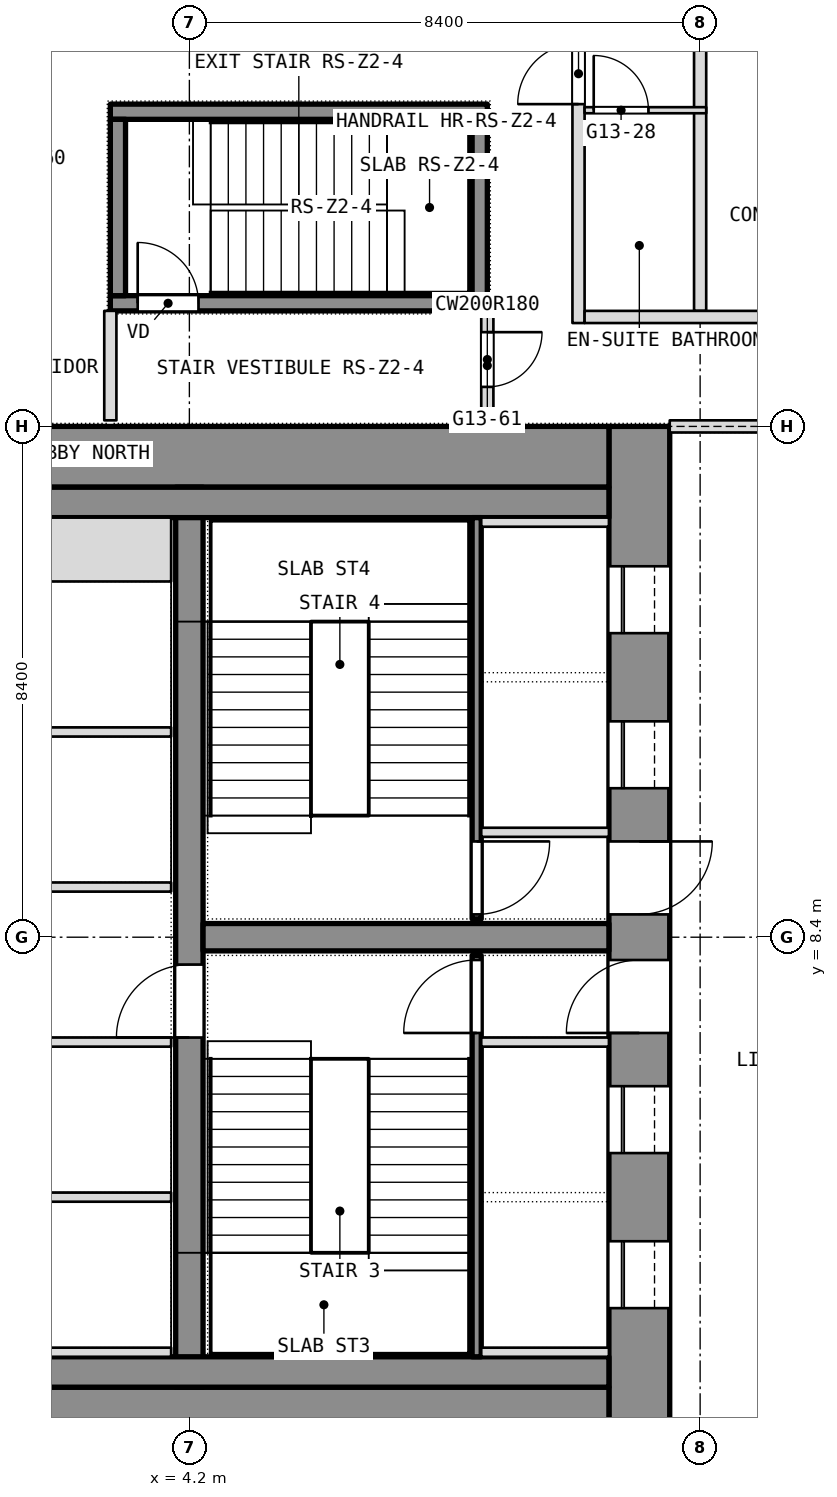
"""IFC4 building model, lengths in metres.
Left out: names, types, materials, properties, quantities, classifications, styles, units other than length and angle.
Written with IfcOpenShell. Run it as: python <this file> out.ifc"""

import sys

from ifc_helpers import new_model, si_unit, direction, frame, frame_2d, origin, place, context, subcontext, project, spatial, rectangle, extrude, element, fill, save


model = new_model("IFC4")
c1 = context("Model", 3, precision=1e-05, world=origin(), true_north=direction((0.0, 1.0)))
c2 = subcontext(c1, "Body", "Model", "MODEL_VIEW")
j1 = project(units=[si_unit("LENGTHUNIT", "METRE"), si_unit("PLANEANGLEUNIT", "RADIAN")], contexts=[c1])
p1 = place(None, origin())
s1 = spatial("IfcSite", under=j1, at=p1, CompositionType="ELEMENT")
p2 = place(p1, origin())
s2 = spatial("IfcBuilding", under=s1, at=p2, CompositionType="ELEMENT")
p3 = place(p2, frame((0.0, 0.0, 151.7)))
s3 = spatial("IfcBuildingStorey", under=s2, at=p3, CompositionType="ELEMENT", Elevation=151.7)
p4 = place(p3, frame((11.6, 0.0, 0.0), z_axis=(0.0, 0.0, 1.0), x_axis=(0.0, 1.0, 0.0)))
e1 = element("IfcWall", 1, at=p4, inside=s3, PredefinedType="SHEAR", context=c2, shape_type="SweptSolid", body=[
    extrude(rectangle(XDim=16.8, YDim=1.0, at=frame_2d((8.4, 0.0))), origin(), (0.0, 0.0, 1.0), 3.6),
])
p5 = place(p4, frame((2.3, 0.0, 0.0)))
e2 = element("IfcOpeningElement", 2, at=p5, cuts=e1, PredefinedType="OPENING", context=c2, shape_type="SweptSolid", body=[
    extrude(rectangle(XDim=1.1, YDim=2.1, at=frame_2d((0.55, 1.05))), frame((0.0, 0.5, 0.0), z_axis=(0.0, -1.0, 0.0), x_axis=(1.0, 0.0, 0.0)), (0.0, 0.0, 1.0), 1.0),
])
p6 = place(p4, frame((4.85, 0.0, 0.0)))
e3 = element("IfcOpeningElement", 3, at=p6, cuts=e1, PredefinedType="OPENING", context=c2, shape_type="SweptSolid", body=[
    extrude(rectangle(XDim=1.1, YDim=2.1, at=frame_2d((0.55, 1.05))), frame((0.0, 0.5, 0.0), z_axis=(0.0, -1.0, 0.0), x_axis=(1.0, 0.0, 0.0)), (0.0, 0.0, 1.0), 1.0),
])
p7 = place(p4, frame((6.825, 0.0, 0.0)))
e4 = element("IfcOpeningElement", 4, at=p7, cuts=e1, PredefinedType="OPENING", context=c2, shape_type="SweptSolid", body=[
    extrude(rectangle(XDim=1.2, YDim=2.1, at=frame_2d((0.6, 1.05))), frame((0.0, 0.5, 0.0), z_axis=(0.0, -1.0, 0.0), x_axis=(1.0, 0.0, 0.0)), (0.0, 0.0, 1.0), 1.0),
])
p8 = place(p4, frame((13.4, 0.0, 0.0)))
e5 = element("IfcOpeningElement", 5, at=p8, cuts=e1, PredefinedType="OPENING", context=c2, shape_type="SweptSolid", body=[
    extrude(rectangle(XDim=1.1, YDim=2.1, at=frame_2d((0.55, 1.05))), frame((0.0, 0.5, 0.0), z_axis=(0.0, -1.0, 0.0), x_axis=(1.0, 0.0, 0.0)), (0.0, 0.0, 1.0), 1.0),
])
p9 = place(p4, frame((10.85, 0.0, 0.0)))
e6 = element("IfcOpeningElement", 6, at=p9, cuts=e1, PredefinedType="OPENING", context=c2, shape_type="SweptSolid", body=[
    extrude(rectangle(XDim=1.1, YDim=2.1, at=frame_2d((0.55, 1.05))), frame((0.0, 0.5, 0.0), z_axis=(0.0, -1.0, 0.0), x_axis=(1.0, 0.0, 0.0)), (0.0, 0.0, 1.0), 1.0),
])
p10 = place(p4, frame((8.775, 0.0, 0.0)))
e7 = element("IfcOpeningElement", 7, at=p10, cuts=e1, PredefinedType="OPENING", context=c2, shape_type="SweptSolid", body=[
    extrude(rectangle(XDim=1.2, YDim=2.1, at=frame_2d((0.6, 1.05))), frame((0.0, 0.5, 0.0), z_axis=(0.0, -1.0, 0.0), x_axis=(1.0, 0.0, 0.0)), (0.0, 0.0, 1.0), 1.0),
])
for number, where, z_axis, x_axis in (
    (8, (-11.1, 0.5, 0.0), (0.0, 0.0, 1.0), (1.0, 0.0, 0.0)),
    (9, (-11.1, 16.3, 0.0), (0.0, 0.0, 1.0), (1.0, 0.0, 0.0)),
):
    element("IfcWall", number, at=place(p3, frame(where, z_axis=z_axis, x_axis=x_axis)), inside=s3, PredefinedType="SHEAR", context=c2, shape_type="SweptSolid", body=[
        extrude(rectangle(XDim=22.2, YDim=1.0, at=frame_2d((11.1, 0.0))), origin(), (0.0, 0.0, 1.0), 3.6),
    ])
p11 = place(p3, frame((4.2, 1.0, 0.0), z_axis=(0.0, 0.0, 1.0), x_axis=(0.0, 1.0, 0.0)))
e10 = element("IfcWall", 10, at=p11, inside=s3, PredefinedType="SHEAR", context=c2, shape_type="SweptSolid", body=[
    extrude(rectangle(XDim=14.8, YDim=0.45, at=frame_2d((7.4, 0.0))), origin(), (0.0, 0.0, 1.0), 3.6),
])
p12 = place(p11, frame((5.75, 0.0, 0.0)))
e11 = element("IfcOpeningElement", 11, at=p12, cuts=e10, PredefinedType="OPENING", context=c2, shape_type="SweptSolid", body=[
    extrude(rectangle(XDim=1.2, YDim=2.1, at=frame_2d((0.6, 1.05))), frame((0.0, 0.225, 0.0), z_axis=(0.0, -1.0, 0.0), x_axis=(1.0, 0.0, 0.0)), (0.0, 0.0, 1.0), 0.45),
])
p13 = place(p3, frame((4.425, 8.4, 0.0), z_axis=(0.0, 0.0, 1.0), x_axis=(1.0, 0.0, 0.0)))
e12 = element("IfcWall", 12, at=p13, inside=s3, PredefinedType="SHEAR", context=c2, shape_type="SweptSolid", body=[
    extrude(rectangle(XDim=6.675, YDim=0.45, at=frame_2d((3.337, 0.0))), origin(), (0.0, 0.0, 1.0), 3.6),
])
p14 = place(p3, frame((12.6, 18.7, 0.0), z_axis=(0.0, 0.0, 1.0), x_axis=(0.0, 1.0, 0.0)))
e13 = element("IfcWall", 13, at=p14, inside=s3, PredefinedType="PARTITIONING", context=c2, shape_type="SweptSolid", body=[
    extrude(rectangle(XDim=9.24, YDim=0.2, at=frame_2d((4.62, 0.0))), origin(), (0.0, 0.0, 1.0), 3.34),
])
p15 = place(p3, frame((10.6, 18.5, 0.0), z_axis=(0.0, 0.0, 1.0), x_axis=(0.0, 1.0, 0.0)))
e14 = element("IfcWall", 14, at=p15, inside=s3, PredefinedType="PARTITIONING", context=c2, shape_type="SweptSolid", body=[
    extrude(rectangle(XDim=5.0, YDim=0.2, at=frame_2d((2.5, 0.0))), origin(), (0.0, 0.0, 1.0), 3.34),
])
p16 = place(p15, frame((3.6, 0.0, 0.0)))
e15 = element("IfcOpeningElement", 15, at=p16, cuts=e14, PredefinedType="OPENING", context=c2, shape_type="SweptSolid", body=[
    extrude(rectangle(XDim=1.0, YDim=2.1, at=frame_2d((0.5, 1.05))), frame((0.0, 0.1, 0.0), z_axis=(0.0, -1.0, 0.0), x_axis=(1.0, 0.0, 0.0)), (0.0, 0.0, 1.0), 0.2),
])
p17 = place(p3, frame((9.1, 16.9, 0.0), z_axis=(0.0, 0.0, 1.0), x_axis=(0.0, 1.0, 0.0)))
e16 = element("IfcWall", 16, at=p17, inside=s3, PredefinedType="PARTITIONING", context=c2, shape_type="SweptSolid", body=[
    extrude(rectangle(XDim=1.8, YDim=0.2, at=frame_2d((0.9, 0.0))), origin(), (0.0, 0.0, 1.0), 3.34),
])
p18 = place(p17, frame((0.55, 0.0, 0.0)))
e17 = element("IfcOpeningElement", 17, at=p18, cuts=e16, PredefinedType="OPENING", context=c2, shape_type="SweptSolid", body=[
    extrude(rectangle(XDim=0.9, YDim=2.1, at=frame_2d((0.45, 1.05))), frame((0.0, 0.1, 0.0), z_axis=(0.0, -1.0, 0.0), x_axis=(1.0, 0.0, 0.0)), (0.0, 0.0, 1.0), 0.2),
])
p19 = place(p3, frame((2.9, 16.9, 0.0), z_axis=(0.0, 0.0, 1.0), x_axis=(0.0, 1.0, 0.0)))
e18 = element("IfcWall", 18, at=p19, inside=s3, PredefinedType="PARTITIONING", context=c2, shape_type="SweptSolid", body=[
    extrude(rectangle(XDim=1.8, YDim=0.2, at=frame_2d((0.9, 0.0))), origin(), (0.0, 0.0, 1.0), 3.34),
])
p20 = place(p3, frame((10.7, 18.6, 0.0), z_axis=(0.0, 0.0, 1.0), x_axis=(1.0, 0.0, 0.0)))
e19 = element("IfcWall", 19, at=p20, inside=s3, PredefinedType="PARTITIONING", context=c2, shape_type="SweptSolid", body=[
    extrude(rectangle(XDim=6.2, YDim=0.2, at=frame_2d((3.1, 0.0))), origin(), (0.0, 0.0, 1.0), 3.34),
])
p21 = place(p3, frame((10.7, 22.0, 0.0), z_axis=(0.0, 0.0, 1.0), x_axis=(1.0, 0.0, 0.0)))
e20 = element("IfcWall", 20, at=p21, inside=s3, PredefinedType="PARTITIONING", context=c2, shape_type="SweptSolid", body=[
    extrude(rectangle(XDim=2.0, YDim=0.1, at=frame_2d((1.0, 0.0))), origin(), (0.0, 0.0, 1.0), 3.34),
])
p22 = place(p21, frame((0.15, 0.0, 0.0)))
e21 = element("IfcOpeningElement", 21, at=p22, cuts=e20, PredefinedType="OPENING", context=c2, shape_type="SweptSolid", body=[
    extrude(rectangle(XDim=0.9, YDim=2.1, at=frame_2d((0.45, 1.05))), frame((0.0, 0.05, 0.0), z_axis=(0.0, -1.0, 0.0), x_axis=(1.0, 0.0, 0.0)), (0.0, 0.0, 1.0), 0.1),
])
for number, where, z_axis, x_axis in (
    (22, (-11.1, 1.25, 0.0), (0.0, 0.0, 1.0), (1.0, 0.0, 0.0)),
    (23, (-11.1, 15.55, 0.0), (0.0, 0.0, 1.0), (1.0, 0.0, 0.0)),
):
    element("IfcWall", number, at=place(p3, frame(where, z_axis=z_axis, x_axis=x_axis)), inside=s3, PredefinedType="PARTITIONING", context=c2, shape_type="SweptSolid", body=[
        extrude(rectangle(XDim=22.2, YDim=0.5, at=frame_2d((11.1, 0.0))), origin(), (0.0, 0.0, 1.0), 3.34),
    ])
p23 = place(p3, frame((8.925, 1.5, 0.0), z_axis=(0.0, 0.0, 1.0), x_axis=(0.0, 1.0, 0.0)))
e24 = element("IfcWall", 24, at=p23, inside=s3, PredefinedType="SHEAR", context=c2, shape_type="SweptSolid", body=[
    extrude(rectangle(XDim=6.6, YDim=0.15, at=frame_2d((3.3, 0.0))), origin(), (0.0, 0.0, 1.0), 3.34),
])
p24 = place(p23, frame((5.325, 0.0, 0.0)))
e25 = element("IfcOpeningElement", 25, at=p24, cuts=e24, PredefinedType="OPENING", context=c2, shape_type="SweptSolid", body=[
    extrude(rectangle(XDim=1.2, YDim=2.1, at=frame_2d((0.6, 1.05))), frame((0.0, 0.075, 0.0), z_axis=(0.0, -1.0, 0.0), x_axis=(1.0, 0.0, 0.0)), (0.0, 0.0, 1.0), 0.15),
])
for number, where, z_axis, x_axis in (
    (26, (9.0, 6.675, 0.0), (0.0, 0.0, 1.0), (1.0, 0.0, 0.0)),
    (27, (9.0, 1.575, 0.0), (0.0, 0.0, 1.0), (1.0, 0.0, 0.0)),
):
    element("IfcWall", number, at=place(p3, frame(where, z_axis=z_axis, x_axis=x_axis)), inside=s3, PredefinedType="SHEAR", context=c2, shape_type="SweptSolid", body=[
        extrude(rectangle(XDim=2.1, YDim=0.15, at=frame_2d((1.05, 0.0))), origin(), (0.0, 0.0, 1.0), 3.6),
    ])
p25 = place(p3, frame((8.925, 8.7, 0.0), z_axis=(0.0, 0.0, 1.0), x_axis=(0.0, 1.0, 0.0)))
e28 = element("IfcWall", 28, at=p25, inside=s3, PredefinedType="SHEAR", context=c2, shape_type="SweptSolid", body=[
    extrude(rectangle(XDim=6.6, YDim=0.15, at=frame_2d((3.3, 0.0))), origin(), (0.0, 0.0, 1.0), 3.34),
])
p26 = place(p25, frame((0.075, 0.0, 0.0)))
e29 = element("IfcOpeningElement", 29, at=p26, cuts=e28, PredefinedType="OPENING", context=c2, shape_type="SweptSolid", body=[
    extrude(rectangle(XDim=1.2, YDim=2.1, at=frame_2d((0.6, 1.05))), frame((0.0, 0.075, 0.0), z_axis=(0.0, -1.0, 0.0), x_axis=(1.0, 0.0, 0.0)), (0.0, 0.0, 1.0), 0.15),
])
for number, where, z_axis, x_axis in (
    (30, (9.0, 10.125, 0.0), (0.0, 0.0, 1.0), (1.0, 0.0, 0.0)),
    (31, (9.0, 15.225, 0.0), (0.0, 0.0, 1.0), (1.0, 0.0, 0.0)),
):
    element("IfcWall", number, at=place(p3, frame(where, z_axis=z_axis, x_axis=x_axis)), inside=s3, PredefinedType="SHEAR", context=c2, shape_type="SweptSolid", body=[
        extrude(rectangle(XDim=2.1, YDim=0.15, at=frame_2d((1.05, 0.0))), origin(), (0.0, 0.0, 1.0), 3.6),
    ])
p27 = place(p3, frame((-3.9, 4.125, 0.0), z_axis=(0.0, 0.0, 1.0), x_axis=(1.0, 0.0, 0.0)))
e32 = element("IfcWall", 32, at=p27, inside=s3, PredefinedType="PARTITIONING", context=c2, shape_type="SweptSolid", body=[
    extrude(rectangle(XDim=7.8, YDim=0.15, at=frame_2d((3.9, 0.0))), origin(), (0.0, 0.0, 1.0), 3.34),
])
p28 = place(p27, frame((3.75, 0.0, 0.0)))
e33 = element("IfcOpeningElement", 33, at=p28, cuts=e32, PredefinedType="OPENING", context=c2, shape_type="SweptSolid", body=[
    extrude(rectangle(XDim=1.2, YDim=2.1, at=frame_2d((0.6, 1.05))), frame((0.0, 0.075, 0.0), z_axis=(0.0, -1.0, 0.0), x_axis=(1.0, 0.0, 0.0)), (0.0, 0.0, 1.0), 0.15),
])
p29 = place(p3, frame((-3.9, 11.775, 0.0), z_axis=(0.0, 0.0, 1.0), x_axis=(1.0, 0.0, 0.0)))
e34 = element("IfcWall", 34, at=p29, inside=s3, PredefinedType="PARTITIONING", context=c2, shape_type="SweptSolid", body=[
    extrude(rectangle(XDim=7.8, YDim=0.15, at=frame_2d((3.9, 0.0))), origin(), (0.0, 0.0, 1.0), 3.34),
])
p30 = place(p29, frame((3.3, 0.0, 0.0)))
e35 = element("IfcOpeningElement", 35, at=p30, cuts=e34, PredefinedType="OPENING", context=c2, shape_type="SweptSolid", body=[
    extrude(rectangle(XDim=1.2, YDim=2.1, at=frame_2d((0.6, 1.05))), frame((0.0, 0.075, 0.0), z_axis=(0.0, -1.0, 0.0), x_axis=(1.0, 0.0, 0.0)), (0.0, 0.0, 1.0), 0.15),
])
p31 = place(p3, frame((1.65, 1.575, 0.0), z_axis=(0.0, 0.0, 1.0), x_axis=(1.0, 0.0, 0.0)))
e36 = element("IfcWall", 36, at=p31, inside=s3, PredefinedType="SHEAR", context=c2, shape_type="SweptSolid", body=[
    extrude(rectangle(XDim=2.25, YDim=0.15, at=frame_2d((1.125, 0.0))), origin(), (0.0, 0.0, 1.0), 3.6),
])
p32 = place(p3, frame((1.65, 14.775, 0.0), z_axis=(0.0, 0.0, 1.0), x_axis=(1.0, 0.0, 0.0)))
e37 = element("IfcWall", 37, at=p32, inside=s3, PredefinedType="SHEAR", context=c2, shape_type="SweptSolid", body=[
    extrude(rectangle(XDim=2.25, YDim=1.05, at=frame_2d((1.125, 0.0))), origin(), (0.0, 0.0, 1.0), 3.6),
])
for number, where, z_axis, x_axis in (
    (38, (1.65, 6.675, 0.0), (0.0, 0.0, 1.0), (1.0, 0.0, 0.0)),
    (39, (1.65, 9.225, 0.0), (0.0, 0.0, 1.0), (1.0, 0.0, 0.0)),
):
    element("IfcWall", number, at=place(p3, frame(where, z_axis=z_axis, x_axis=x_axis)), inside=s3, PredefinedType="SHEAR", context=c2, shape_type="SweptSolid", body=[
        extrude(rectangle(XDim=2.25, YDim=0.15, at=frame_2d((1.125, 0.0))), origin(), (0.0, 0.0, 1.0), 3.6),
    ])
p33 = place(p3, frame((12.1, 16.8, 0.0), z_axis=(0.0, 0.0, 1.0), x_axis=(1.0, 0.0, 0.0)))
e40 = element("IfcWall", 40, at=p33, inside=s3, PredefinedType="PARTITIONING", context=c2, shape_type="SweptSolid", body=[
    extrude(rectangle(XDim=4.6, YDim=0.2, at=frame_2d((2.3, 0.0))), origin(), (0.0, 0.0, 1.0), 2.89),
])
p34 = place(p3, frame((2.9, 18.825, 0.1), z_axis=(0.0, 0.0, 1.0), x_axis=(1.0, 0.0, 0.0)))
e41 = element("IfcWall", 41, at=p34, inside=s3, PredefinedType="SHEAR", context=c2, shape_type="SweptSolid", body=[
    extrude(rectangle(XDim=6.2, YDim=0.25, at=frame_2d((3.1, 0.0))), origin(), (0.0, 0.0, 1.0), 3.6),
])
p35 = place(p34, frame((0.45, 0.0, 0.0)))
e42 = element("IfcOpeningElement", 42, at=p35, cuts=e41, PredefinedType="OPENING", context=c2, shape_type="SweptSolid", body=[
    extrude(rectangle(XDim=1.0, YDim=2.1, at=frame_2d((0.5, 1.05))), frame((0.0, 0.125, 0.0), z_axis=(0.0, -1.0, 0.0), x_axis=(1.0, 0.0, 0.0)), (0.0, 0.0, 1.0), 0.25),
])
p36 = place(p3, frame((2.9, 21.975, 0.1), z_axis=(0.0, 0.0, 1.0), x_axis=(1.0, 0.0, 0.0)))
e43 = element("IfcWall", 43, at=p36, inside=s3, PredefinedType="SHEAR", context=c2, shape_type="SweptSolid", body=[
    extrude(rectangle(XDim=6.2, YDim=0.25, at=frame_2d((3.1, 0.0))), origin(), (0.0, 0.0, 1.0), 3.6),
])
for number, where, z_axis, x_axis in (
    (44, (3.025, 18.95, 0.1), (0.0, 0.0, 1.0), (0.0, 1.0, 0.0)),
    (45, (8.975, 18.95, 0.1), (0.0, 0.0, 1.0), (0.0, 1.0, 0.0)),
):
    element("IfcWall", number, at=place(p3, frame(where, z_axis=z_axis, x_axis=x_axis)), inside=s3, PredefinedType="SHEAR", context=c2, shape_type="SweptSolid", body=[
        extrude(rectangle(XDim=2.9, YDim=0.25, at=frame_2d((1.45, 0.0))), origin(), (0.0, 0.0, 1.0), 3.6),
    ])
p37 = place(p16, origin())
e46 = element("IfcDoor", 46, at=p37, inside=s3, OperationType="SINGLE_SWING_LEFT", PredefinedType="DOOR", context=c2, shape_type="SweptSolid", body=[
    extrude(rectangle(XDim=1.0, YDim=2.1, at=frame_2d((0.5, 1.05))), frame((0.0, 0.025, 0.0), z_axis=(0.0, -1.0, 0.0), x_axis=(1.0, 0.0, 0.0)), (0.0, 0.0, 1.0), 0.05),
])
fill(e15, e46)
p38 = place(p18, origin())
e47 = element("IfcDoor", 47, at=p38, inside=s3, OperationType="SINGLE_SWING_RIGHT", PredefinedType="DOOR", context=c2, shape_type="SweptSolid", body=[
    extrude(rectangle(XDim=0.9, YDim=2.1, at=frame_2d((0.45, 1.05))), frame((0.0, 0.025, 0.0), z_axis=(0.0, -1.0, 0.0), x_axis=(1.0, 0.0, 0.0)), (0.0, 0.0, 1.0), 0.05),
])
fill(e17, e47)
p39 = place(p22, origin())
e48 = element("IfcDoor", 48, at=p39, inside=s3, OperationType="SINGLE_SWING_RIGHT", PredefinedType="DOOR", context=c2, shape_type="SweptSolid", body=[
    extrude(rectangle(XDim=0.9, YDim=2.1, at=frame_2d((0.45, 1.05))), frame((0.0, 0.025, 0.0), z_axis=(0.0, -1.0, 0.0), x_axis=(1.0, 0.0, 0.0)), (0.0, 0.0, 1.0), 0.05),
])
fill(e21, e48)
p40 = place(p35, origin())
e49 = element("IfcDoor", 49, at=p40, inside=s3, OperationType="SINGLE_SWING_LEFT", PredefinedType="DOOR", context=c2, shape_type="SweptSolid", body=[
    extrude(rectangle(XDim=1.0, YDim=2.1, at=frame_2d((0.5, 1.05))), frame((0.0, 0.025, 0.0), z_axis=(0.0, -1.0, 0.0), x_axis=(1.0, 0.0, 0.0)), (0.0, 0.0, 1.0), 0.05),
])
fill(e42, e49)
p41 = place(p5, origin())
e50 = element("IfcDoor", 50, at=p41, inside=s3, OperationType="SLIDING_TO_LEFT", PredefinedType="DOOR", context=c2, shape_type="SweptSolid", body=[
    extrude(rectangle(XDim=1.1, YDim=2.1, at=frame_2d((0.55, 1.05))), frame((0.0, 0.025, 0.0), z_axis=(0.0, -1.0, 0.0), x_axis=(1.0, 0.0, 0.0)), (0.0, 0.0, 1.0), 0.05),
])
fill(e2, e50)
p42 = place(p6, origin())
e51 = element("IfcDoor", 51, at=p42, inside=s3, OperationType="SLIDING_TO_LEFT", PredefinedType="DOOR", context=c2, shape_type="SweptSolid", body=[
    extrude(rectangle(XDim=1.1, YDim=2.1, at=frame_2d((0.55, 1.05))), frame((0.0, 0.025, 0.0), z_axis=(0.0, -1.0, 0.0), x_axis=(1.0, 0.0, 0.0)), (0.0, 0.0, 1.0), 0.05),
])
fill(e3, e51)
p43 = place(p7, origin())
e52 = element("IfcDoor", 52, at=p43, inside=s3, OperationType="SINGLE_SWING_LEFT", PredefinedType="DOOR", context=c2, shape_type="SweptSolid", body=[
    extrude(rectangle(XDim=1.2, YDim=2.1, at=frame_2d((0.6, 1.05))), frame((0.0, 0.025, 0.0), z_axis=(0.0, -1.0, 0.0), x_axis=(1.0, 0.0, 0.0)), (0.0, 0.0, 1.0), 0.05),
])
fill(e4, e52)
p44 = place(p24, origin())
e53 = element("IfcDoor", 53, at=p44, inside=s3, OperationType="SINGLE_SWING_LEFT", PredefinedType="DOOR", context=c2, shape_type="SweptSolid", body=[
    extrude(rectangle(XDim=1.2, YDim=2.1, at=frame_2d((0.6, 1.05))), frame((0.0, 0.025, 0.0), z_axis=(0.0, -1.0, 0.0), x_axis=(1.0, 0.0, 0.0)), (0.0, 0.0, 1.0), 0.05),
])
fill(e25, e53)
p45 = place(p8, origin())
e54 = element("IfcDoor", 54, at=p45, inside=s3, OperationType="SLIDING_TO_LEFT", PredefinedType="DOOR", context=c2, shape_type="SweptSolid", body=[
    extrude(rectangle(XDim=1.1, YDim=2.1, at=frame_2d((0.55, 1.05))), frame((0.0, 0.025, 0.0), z_axis=(0.0, -1.0, 0.0), x_axis=(1.0, 0.0, 0.0)), (0.0, 0.0, 1.0), 0.05),
])
fill(e5, e54)
p46 = place(p9, origin())
e55 = element("IfcDoor", 55, at=p46, inside=s3, OperationType="SLIDING_TO_LEFT", PredefinedType="DOOR", context=c2, shape_type="SweptSolid", body=[
    extrude(rectangle(XDim=1.1, YDim=2.1, at=frame_2d((0.55, 1.05))), frame((0.0, 0.025, 0.0), z_axis=(0.0, -1.0, 0.0), x_axis=(1.0, 0.0, 0.0)), (0.0, 0.0, 1.0), 0.05),
])
fill(e6, e55)
p47 = place(p10, origin())
e56 = element("IfcDoor", 56, at=p47, inside=s3, OperationType="SINGLE_SWING_LEFT", PredefinedType="DOOR", context=c2, shape_type="SweptSolid", body=[
    extrude(rectangle(XDim=1.2, YDim=2.1, at=frame_2d((0.6, 1.05))), frame((0.0, 0.025, 0.0), z_axis=(0.0, -1.0, 0.0), x_axis=(1.0, 0.0, 0.0)), (0.0, 0.0, 1.0), 0.05),
])
fill(e7, e56)
p48 = place(p26, origin())
e57 = element("IfcDoor", 57, at=p48, inside=s3, OperationType="SINGLE_SWING_LEFT", PredefinedType="DOOR", context=c2, shape_type="SweptSolid", body=[
    extrude(rectangle(XDim=1.2, YDim=2.1, at=frame_2d((0.6, 1.05))), frame((0.0, 0.025, 0.0), z_axis=(0.0, -1.0, 0.0), x_axis=(1.0, 0.0, 0.0)), (0.0, 0.0, 1.0), 0.05),
])
fill(e29, e57)
p49 = place(p12, origin())
e58 = element("IfcDoor", 58, at=p49, inside=s3, OperationType="SINGLE_SWING_LEFT", PredefinedType="DOOR", context=c2, shape_type="SweptSolid", body=[
    extrude(rectangle(XDim=1.2, YDim=2.1, at=frame_2d((0.6, 1.05))), frame((0.0, 0.025, 0.0), z_axis=(0.0, -1.0, 0.0), x_axis=(1.0, 0.0, 0.0)), (0.0, 0.0, 1.0), 0.05),
])
fill(e11, e58)
save(model, sys.argv[1])
